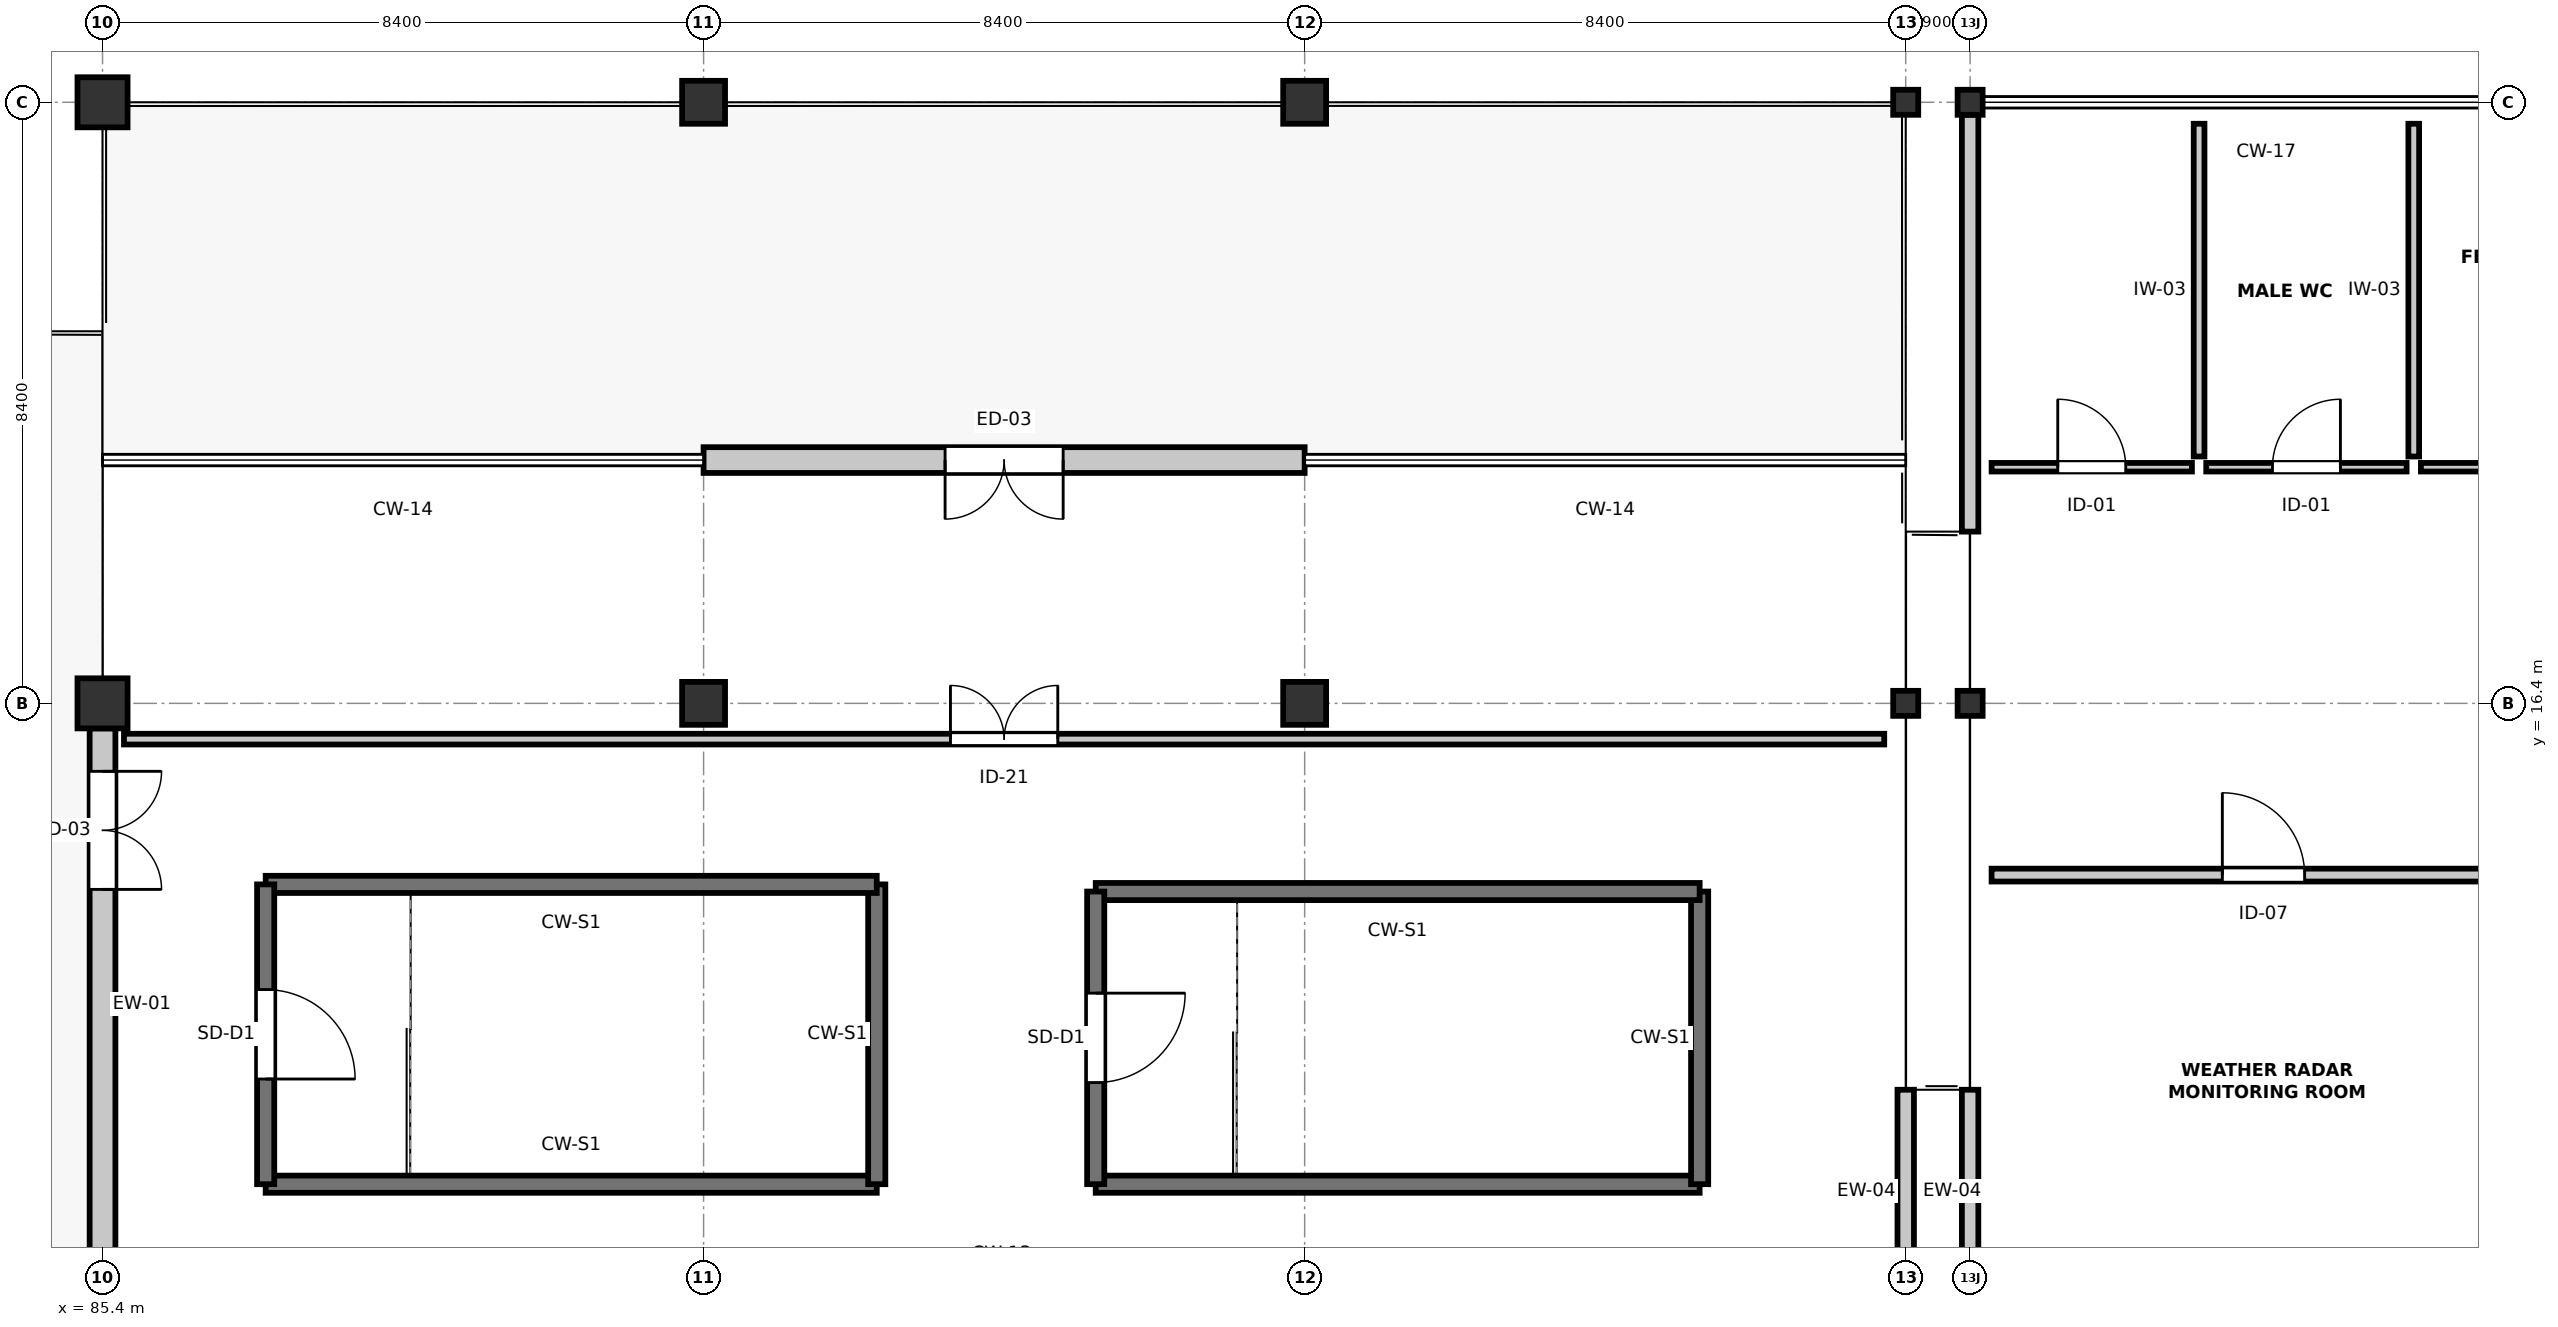
"""IFC4 building model, lengths in metres.
Left out: names, types, materials, properties, quantities, classifications, styles, units other than length and angle.
Written with IfcOpenShell. Run it as: python <this file> out.ifc"""

import sys

from ifc_helpers import new_model, si_unit, direction, frame, frame_2d, origin, origin_2d, place, context, subcontext, project, spatial, rectangle, circle, i_section, extrude, element, fill, save


model = new_model("IFC4")
c1 = context("Model", 3, precision=1e-05, world=origin(), true_north=direction((0.0, 1.0)))
c2 = subcontext(c1, "Body", "Model", "MODEL_VIEW")
j1 = project(units=[si_unit("LENGTHUNIT", "METRE"), si_unit("PLANEANGLEUNIT", "RADIAN")], contexts=[c1])
p1 = place(None, origin())
s1 = spatial("IfcSite", under=j1, at=p1, CompositionType="ELEMENT")
p2 = place(p1, origin())
s2 = spatial("IfcBuilding", under=s1, at=p2, CompositionType="ELEMENT")
p3 = place(p2, frame((0.0, 0.0, 14.4)))
s3 = spatial("IfcBuildingStorey", under=s2, at=p3, CompositionType="ELEMENT", Elevation=14.4)
for number, where, z_axis, x_axis in (
    (1, (85.4, 16.4, 0.0), (0.0, 0.0, 1.0), (1.0, 0.0, 0.0)),
    (2, (85.4, 24.8, 0.0), (0.0, 0.0, 1.0), (1.0, 0.0, 0.0)),
):
    element("IfcColumn", number, at=place(p3, frame(where, z_axis=z_axis, x_axis=x_axis)), inside=s3, PredefinedType="COLUMN", context=c2, shape_type="SweptSolid", body=[
        extrude(rectangle(XDim=0.7, YDim=0.7, at=origin_2d()), origin(), (0.0, 0.0, 1.0), 4.8),
    ])
for number, where, z_axis, x_axis in (
    (3, (93.8, 16.4, 0.0), (0.0, 0.0, 1.0), (1.0, 0.0, 0.0)),
    (4, (93.8, 24.8, 0.0), (0.0, 0.0, 1.0), (1.0, 0.0, 0.0)),
):
    element("IfcColumn", number, at=place(p3, frame(where, z_axis=z_axis, x_axis=x_axis)), inside=s3, PredefinedType="COLUMN", context=c2, shape_type="SweptSolid", body=[
        extrude(rectangle(XDim=0.6, YDim=0.6, at=origin_2d()), origin(), (0.0, 0.0, 1.0), 4.8),
    ])
for number, where, z_axis, x_axis in (
    (5, (102.2, 16.4, 0.0), (0.0, 0.0, 1.0), (1.0, 0.0, 0.0)),
    (6, (102.2, 24.8, 0.0), (0.0, 0.0, 1.0), (1.0, 0.0, 0.0)),
):
    element("IfcColumn", number, at=place(p3, frame(where, z_axis=z_axis, x_axis=x_axis)), inside=s3, PredefinedType="COLUMN", context=c2, shape_type="SweptSolid", body=[
        extrude(circle(Radius=0.375, at=origin_2d()), origin(), (0.0, 0.0, 1.0), 4.8),
    ])
for number, where, z_axis, x_axis in (
    (7, (110.6, 16.4, 0.0), (0.0, 0.0, 1.0), (1.0, 0.0, 0.0)),
    (8, (110.6, 24.8, 0.0), (0.0, 0.0, 1.0), (1.0, 0.0, 0.0)),
    (9, (111.5, 16.4, 0.0), (0.0, 0.0, 1.0), (1.0, 0.0, 0.0)),
    (10, (111.5, 24.8, 0.0), (0.0, 0.0, 1.0), (1.0, 0.0, 0.0)),
):
    element("IfcColumn", number, at=place(p3, frame(where, z_axis=z_axis, x_axis=x_axis)), inside=s3, PredefinedType="COLUMN", context=c2, shape_type="SweptSolid", body=[
        extrude(i_section(OverallWidth=0.35, OverallDepth=0.35, WebThickness=0.012, FlangeThickness=0.019, FilletRadius=0.02, at=origin_2d()), origin(), (0.0, 0.0, 1.0), 4.8),
    ])
p4 = place(p3, frame((110.6, 8.175, 0.0), z_axis=(0.0, 0.0, 1.0), x_axis=(0.0, 1.0, 0.0)))
e11 = element("IfcWall", 11, at=p4, inside=s3, PredefinedType="STANDARD", context=c2, shape_type="SweptSolid", body=[
    extrude(rectangle(XDim=2.825, YDim=0.23, at=frame_2d((1.413, 0.0))), origin(), (0.0, 0.0, 1.0), 3.735),
])
p5 = place(p3, frame((102.2, 19.8, 0.0), z_axis=(0.0, 0.0, 1.0), x_axis=(-1.0, 0.0, 0.0)))
e12 = element("IfcWall", 12, at=p5, inside=s3, PredefinedType="STANDARD", context=c2, shape_type="SweptSolid", body=[
    extrude(rectangle(XDim=8.4, YDim=0.36, at=frame_2d((4.2, 0.0))), origin(), (0.0, 0.0, 1.0), 3.735),
])
p6 = place(p5, frame((3.375, 0.0, 0.0)))
e13 = element("IfcOpeningElement", 13, at=p6, cuts=e12, PredefinedType="OPENING", context=c2, shape_type="SweptSolid", body=[
    extrude(rectangle(XDim=1.65, YDim=2.25, at=frame_2d((0.825, 1.125))), frame((0.0, 0.19, 0.0), z_axis=(0.0, -1.0, 0.0), x_axis=(1.0, 0.0, 0.0)), (0.0, 0.0, 1.0), 0.38),
])
p7 = place(p3, frame((85.4, 16.05, 0.0), z_axis=(0.0, 0.0, 1.0), x_axis=(0.0, -1.0, 0.0)))
e14 = element("IfcWall", 14, at=p7, inside=s3, PredefinedType="STANDARD", context=c2, shape_type="SweptSolid", body=[
    extrude(rectangle(XDim=7.7, YDim=0.36, at=frame_2d((3.85, 0.0))), origin(), (0.0, 0.0, 1.0), 3.735),
])
p8 = place(p7, frame((0.6, 0.0, 0.0)))
e15 = element("IfcOpeningElement", 15, at=p8, cuts=e14, PredefinedType="OPENING", context=c2, shape_type="SweptSolid", body=[
    extrude(rectangle(XDim=1.65, YDim=2.25, at=frame_2d((0.825, 1.125))), frame((0.0, 0.19, 0.0), z_axis=(0.0, -1.0, 0.0), x_axis=(1.0, 0.0, 0.0)), (0.0, 0.0, 1.0), 0.38),
])
p9 = place(p3, frame((111.5, 8.175, 0.0), z_axis=(0.0, 0.0, 1.0), x_axis=(0.0, 1.0, 0.0)))
e16 = element("IfcWall", 16, at=p9, inside=s3, PredefinedType="STANDARD", context=c2, shape_type="SweptSolid", body=[
    extrude(rectangle(XDim=2.825, YDim=0.23, at=frame_2d((1.413, 0.0))), origin(), (0.0, 0.0, 1.0), 3.615),
])
p10 = place(p3, frame((111.5, 18.8, 0.0), z_axis=(0.0, 0.0, 1.0), x_axis=(0.0, 1.0, 0.0)))
e17 = element("IfcWall", 17, at=p10, inside=s3, PredefinedType="STANDARD", context=c2, shape_type="SweptSolid", body=[
    extrude(rectangle(XDim=5.825, YDim=0.23, at=frame_2d((2.913, 0.0))), origin(), (0.0, 0.0, 1.0), 3.615),
])
p11 = place(p3, frame((87.68, 9.68, 0.0), z_axis=(0.0, 0.0, 1.0), x_axis=(1.0, 0.0, 0.0)))
e18 = element("IfcWall", 18, at=p11, inside=s3, PredefinedType="SHEAR", context=c2, shape_type="SweptSolid", body=[
    extrude(rectangle(XDim=8.54, YDim=0.24, at=frame_2d((4.27, 0.0))), origin(), (0.0, 0.0, 1.0), 4.5),
])
p12 = place(p3, frame((96.22, 9.68, 0.0), z_axis=(0.0, 0.0, 1.0), x_axis=(0.0, 1.0, 0.0)))
e19 = element("IfcWall", 19, at=p12, inside=s3, PredefinedType="SHEAR", context=c2, shape_type="SweptSolid", body=[
    extrude(rectangle(XDim=4.19, YDim=0.24, at=frame_2d((2.095, 0.0))), origin(), (0.0, 0.0, 1.0), 4.5),
])
p13 = place(p3, frame((96.22, 13.87, 0.0), z_axis=(0.0, 0.0, 1.0), x_axis=(-1.0, 0.0, 0.0)))
e20 = element("IfcWall", 20, at=p13, inside=s3, PredefinedType="SHEAR", context=c2, shape_type="SweptSolid", body=[
    extrude(rectangle(XDim=8.54, YDim=0.24, at=frame_2d((4.27, 0.0))), origin(), (0.0, 0.0, 1.0), 4.5),
])
p14 = place(p3, frame((87.68, 13.87, 0.0), z_axis=(0.0, 0.0, 1.0), x_axis=(0.0, -1.0, 0.0)))
e21 = element("IfcWall", 21, at=p14, inside=s3, PredefinedType="SHEAR", context=c2, shape_type="SweptSolid", body=[
    extrude(rectangle(XDim=4.19, YDim=0.24, at=frame_2d((2.095, 0.0))), origin(), (0.0, 0.0, 1.0), 4.5),
])
p15 = place(p14, frame((1.47, 0.0, 0.0)))
e22 = element("IfcOpeningElement", 22, at=p15, cuts=e21, PredefinedType="OPENING", context=c2, shape_type="SweptSolid", body=[
    extrude(rectangle(XDim=1.25, YDim=2.2, at=frame_2d((0.625, 1.1))), frame((0.0, 0.13, 0.0), z_axis=(0.0, -1.0, 0.0), x_axis=(1.0, 0.0, 0.0)), (0.0, 0.0, 1.0), 0.26),
])
p16 = place(p3, frame((99.28, 9.68, 0.0), z_axis=(0.0, 0.0, 1.0), x_axis=(1.0, 0.0, 0.0)))
e23 = element("IfcWall", 23, at=p16, inside=s3, PredefinedType="SHEAR", context=c2, shape_type="SweptSolid", body=[
    extrude(rectangle(XDim=8.44, YDim=0.24, at=frame_2d((4.22, 0.0))), origin(), (0.0, 0.0, 1.0), 4.5),
])
p17 = place(p3, frame((107.72, 9.68, 0.0), z_axis=(0.0, 0.0, 1.0), x_axis=(0.0, 1.0, 0.0)))
e24 = element("IfcWall", 24, at=p17, inside=s3, PredefinedType="SHEAR", context=c2, shape_type="SweptSolid", body=[
    extrude(rectangle(XDim=4.09, YDim=0.24, at=frame_2d((2.045, 0.0))), origin(), (0.0, 0.0, 1.0), 4.5),
])
p18 = place(p3, frame((107.72, 13.77, 0.0), z_axis=(0.0, 0.0, 1.0), x_axis=(-1.0, 0.0, 0.0)))
e25 = element("IfcWall", 25, at=p18, inside=s3, PredefinedType="SHEAR", context=c2, shape_type="SweptSolid", body=[
    extrude(rectangle(XDim=8.44, YDim=0.24, at=frame_2d((4.22, 0.0))), origin(), (0.0, 0.0, 1.0), 4.5),
])
p19 = place(p3, frame((99.28, 13.77, 0.0), z_axis=(0.0, 0.0, 1.0), x_axis=(0.0, -1.0, 0.0)))
e26 = element("IfcWall", 26, at=p19, inside=s3, PredefinedType="SHEAR", context=c2, shape_type="SweptSolid", body=[
    extrude(rectangle(XDim=4.09, YDim=0.24, at=frame_2d((2.045, 0.0))), origin(), (0.0, 0.0, 1.0), 4.5),
])
p20 = place(p19, frame((1.42, 0.0, 0.0)))
e27 = element("IfcOpeningElement", 27, at=p20, cuts=e26, PredefinedType="OPENING", context=c2, shape_type="SweptSolid", body=[
    extrude(rectangle(XDim=1.25, YDim=2.2, at=frame_2d((0.625, 1.1))), frame((0.0, 0.13, 0.0), z_axis=(0.0, -1.0, 0.0), x_axis=(1.0, 0.0, 0.0)), (0.0, 0.0, 1.0), 0.26),
])
p21 = place(p3, frame((85.7, 15.9, 0.0), z_axis=(0.0, 0.0, 1.0), x_axis=(1.0, 0.0, 0.0)))
e28 = element("IfcWall", 28, at=p21, inside=s3, PredefinedType="PARTITIONING", context=c2, shape_type="SweptSolid", body=[
    extrude(rectangle(XDim=24.6, YDim=0.15, at=frame_2d((12.3, 0.0))), origin(), (0.0, 0.0, 1.0), 4.485),
])
p22 = place(p21, frame((11.55, 0.0, 0.0)))
e29 = element("IfcOpeningElement", 29, at=p22, cuts=e28, PredefinedType="OPENING", context=c2, shape_type="SweptSolid", body=[
    extrude(rectangle(XDim=1.5, YDim=2.24, at=frame_2d((0.75, 1.12))), frame((0.0, 0.085, 0.0), z_axis=(0.0, -1.0, 0.0), x_axis=(1.0, 0.0, 0.0)), (0.0, 0.0, 1.0), 0.17),
])
p23 = place(p3, frame((111.8, 19.7, 0.0), z_axis=(0.0, 0.0, 1.0), x_axis=(1.0, 0.0, 0.0)))
e30 = element("IfcWall", 30, at=p23, inside=s3, PredefinedType="PARTITIONING", context=c2, shape_type="SweptSolid", body=[
    extrude(rectangle(XDim=2.8, YDim=0.12, at=frame_2d((1.4, 0.0))), origin(), (0.0, 0.0, 1.0), 3.615),
])
p24 = place(p23, frame((0.925, 0.0, 0.0)))
e31 = element("IfcOpeningElement", 31, at=p24, cuts=e30, PredefinedType="OPENING", context=c2, shape_type="SweptSolid", body=[
    extrude(rectangle(XDim=0.95, YDim=2.12, at=frame_2d((0.475, 1.06))), frame((0.0, 0.07, 0.0), z_axis=(0.0, -1.0, 0.0), x_axis=(1.0, 0.0, 0.0)), (0.0, 0.0, 1.0), 0.14),
])
p25 = place(p3, frame((114.8, 19.7, 0.0), z_axis=(0.0, 0.0, 1.0), x_axis=(1.0, 0.0, 0.0)))
e32 = element("IfcWall", 32, at=p25, inside=s3, PredefinedType="PARTITIONING", context=c2, shape_type="SweptSolid", body=[
    extrude(rectangle(XDim=2.8, YDim=0.12, at=frame_2d((1.4, 0.0))), origin(), (0.0, 0.0, 1.0), 4.485),
])
p26 = place(p25, frame((0.925, 0.0, 0.0)))
e33 = element("IfcOpeningElement", 33, at=p26, cuts=e32, PredefinedType="OPENING", context=c2, shape_type="SweptSolid", body=[
    extrude(rectangle(XDim=0.95, YDim=2.12, at=frame_2d((0.475, 1.06))), frame((0.0, 0.07, 0.0), z_axis=(0.0, -1.0, 0.0), x_axis=(1.0, 0.0, 0.0)), (0.0, 0.0, 1.0), 0.14),
])
p27 = place(p3, frame((114.7, 19.85, 0.0), z_axis=(0.0, 0.0, 1.0), x_axis=(0.0, 1.0, 0.0)))
e34 = element("IfcWall", 34, at=p27, inside=s3, PredefinedType="PARTITIONING", context=c2, shape_type="SweptSolid", body=[
    extrude(rectangle(XDim=4.65, YDim=0.15, at=frame_2d((2.325, 0.0))), origin(), (0.0, 0.0, 1.0), 3.515),
])
p28 = place(p3, frame((117.8, 19.7, 0.0), z_axis=(0.0, 0.0, 1.0), x_axis=(1.0, 0.0, 0.0)))
e35 = element("IfcWall", 35, at=p28, inside=s3, PredefinedType="PARTITIONING", context=c2, shape_type="SweptSolid", body=[
    extrude(rectangle(XDim=2.8, YDim=0.12, at=frame_2d((1.4, 0.0))), origin(), (0.0, 0.0, 1.0), 3.615),
])
p29 = place(p28, frame((0.925, 0.0, 0.0)))
e36 = element("IfcOpeningElement", 36, at=p29, cuts=e35, PredefinedType="OPENING", context=c2, shape_type="SweptSolid", body=[
    extrude(rectangle(XDim=0.95, YDim=2.12, at=frame_2d((0.475, 1.06))), frame((0.0, 0.07, 0.0), z_axis=(0.0, -1.0, 0.0), x_axis=(1.0, 0.0, 0.0)), (0.0, 0.0, 1.0), 0.14),
])
p30 = place(p3, frame((117.7, 19.85, 0.0), z_axis=(0.0, 0.0, 1.0), x_axis=(0.0, 1.0, 0.0)))
e37 = element("IfcWall", 37, at=p30, inside=s3, PredefinedType="PARTITIONING", context=c2, shape_type="SweptSolid", body=[
    extrude(rectangle(XDim=4.65, YDim=0.15, at=frame_2d((2.325, 0.0))), origin(), (0.0, 0.0, 1.0), 3.515),
])
p31 = place(p3, frame((111.8, 14.0, 0.0), z_axis=(0.0, 0.0, 1.0), x_axis=(1.0, 0.0, 0.0)))
e38 = element("IfcWall", 38, at=p31, inside=s3, PredefinedType="PARTITIONING", context=c2, shape_type="SweptSolid", body=[
    extrude(rectangle(XDim=7.7, YDim=0.18, at=frame_2d((3.85, 0.0))), origin(), (0.0, 0.0, 1.0), 3.615),
])
p32 = place(p31, frame((3.225, 0.0, 0.0)))
e39 = element("IfcOpeningElement", 39, at=p32, cuts=e38, PredefinedType="OPENING", context=c2, shape_type="SweptSolid", body=[
    extrude(rectangle(XDim=1.15, YDim=2.15, at=frame_2d((0.575, 1.075))), frame((0.0, 0.1, 0.0), z_axis=(0.0, -1.0, 0.0), x_axis=(1.0, 0.0, 0.0)), (0.0, 0.0, 1.0), 0.2),
])
p33 = place(p6, origin())
e40 = element("IfcDoor", 40, at=p33, inside=s3, OperationType="DOUBLE_DOOR_SINGLE_SWING", PredefinedType="DOOR", context=c2, shape_type="SweptSolid", body=[
    extrude(rectangle(XDim=1.65, YDim=2.25, at=frame_2d((0.825, 1.125))), frame((0.0, 0.025, 0.0), z_axis=(0.0, -1.0, 0.0), x_axis=(1.0, 0.0, 0.0)), (0.0, 0.0, 1.0), 0.05),
])
fill(e13, e40)
p34 = place(p8, origin())
e41 = element("IfcDoor", 41, at=p34, inside=s3, OperationType="DOUBLE_DOOR_SINGLE_SWING", PredefinedType="DOOR", context=c2, shape_type="SweptSolid", body=[
    extrude(rectangle(XDim=1.65, YDim=2.25, at=frame_2d((0.825, 1.125))), frame((0.0, 0.025, 0.0), z_axis=(0.0, -1.0, 0.0), x_axis=(1.0, 0.0, 0.0)), (0.0, 0.0, 1.0), 0.05),
])
fill(e15, e41)
p35 = place(p15, origin())
e42 = element("IfcDoor", 42, at=p35, inside=s3, OperationType="SINGLE_SWING_RIGHT", PredefinedType="DOOR", context=c2, shape_type="SweptSolid", body=[
    extrude(rectangle(XDim=1.25, YDim=2.2, at=frame_2d((0.625, 1.1))), frame((0.0, 0.025, 0.0), z_axis=(0.0, -1.0, 0.0), x_axis=(1.0, 0.0, 0.0)), (0.0, 0.0, 1.0), 0.05),
])
fill(e22, e42)
p36 = place(p20, origin())
e43 = element("IfcDoor", 43, at=p36, inside=s3, OperationType="SINGLE_SWING_LEFT", PredefinedType="DOOR", context=c2, shape_type="SweptSolid", body=[
    extrude(rectangle(XDim=1.25, YDim=2.2, at=frame_2d((0.625, 1.1))), frame((0.0, 0.025, 0.0), z_axis=(0.0, -1.0, 0.0), x_axis=(1.0, 0.0, 0.0)), (0.0, 0.0, 1.0), 0.05),
])
fill(e27, e43)
p37 = place(p22, origin())
e44 = element("IfcDoor", 44, at=p37, inside=s3, OperationType="DOUBLE_DOOR_SINGLE_SWING", PredefinedType="DOOR", context=c2, shape_type="SweptSolid", body=[
    extrude(rectangle(XDim=1.5, YDim=2.24, at=frame_2d((0.75, 1.12))), frame((0.0, 0.025, 0.0), z_axis=(0.0, -1.0, 0.0), x_axis=(1.0, 0.0, 0.0)), (0.0, 0.0, 1.0), 0.05),
])
fill(e29, e44)
p38 = place(p24, origin())
e45 = element("IfcDoor", 45, at=p38, inside=s3, OperationType="SINGLE_SWING_LEFT", PredefinedType="DOOR", context=c2, shape_type="SweptSolid", body=[
    extrude(rectangle(XDim=0.95, YDim=2.12, at=frame_2d((0.475, 1.06))), frame((0.0, 0.025, 0.0), z_axis=(0.0, -1.0, 0.0), x_axis=(1.0, 0.0, 0.0)), (0.0, 0.0, 1.0), 0.05),
])
fill(e31, e45)
p39 = place(p26, origin())
e46 = element("IfcDoor", 46, at=p39, inside=s3, OperationType="SINGLE_SWING_RIGHT", PredefinedType="DOOR", context=c2, shape_type="SweptSolid", body=[
    extrude(rectangle(XDim=0.95, YDim=2.12, at=frame_2d((0.475, 1.06))), frame((0.0, 0.025, 0.0), z_axis=(0.0, -1.0, 0.0), x_axis=(1.0, 0.0, 0.0)), (0.0, 0.0, 1.0), 0.05),
])
fill(e33, e46)
p40 = place(p32, origin())
e47 = element("IfcDoor", 47, at=p40, inside=s3, OperationType="SINGLE_SWING_LEFT", PredefinedType="DOOR", context=c2, shape_type="SweptSolid", body=[
    extrude(rectangle(XDim=1.15, YDim=2.15, at=frame_2d((0.575, 1.075))), frame((0.0, 0.025, 0.0), z_axis=(0.0, -1.0, 0.0), x_axis=(1.0, 0.0, 0.0)), (0.0, 0.0, 1.0), 0.05),
])
fill(e39, e47)
save(model, sys.argv[1])
